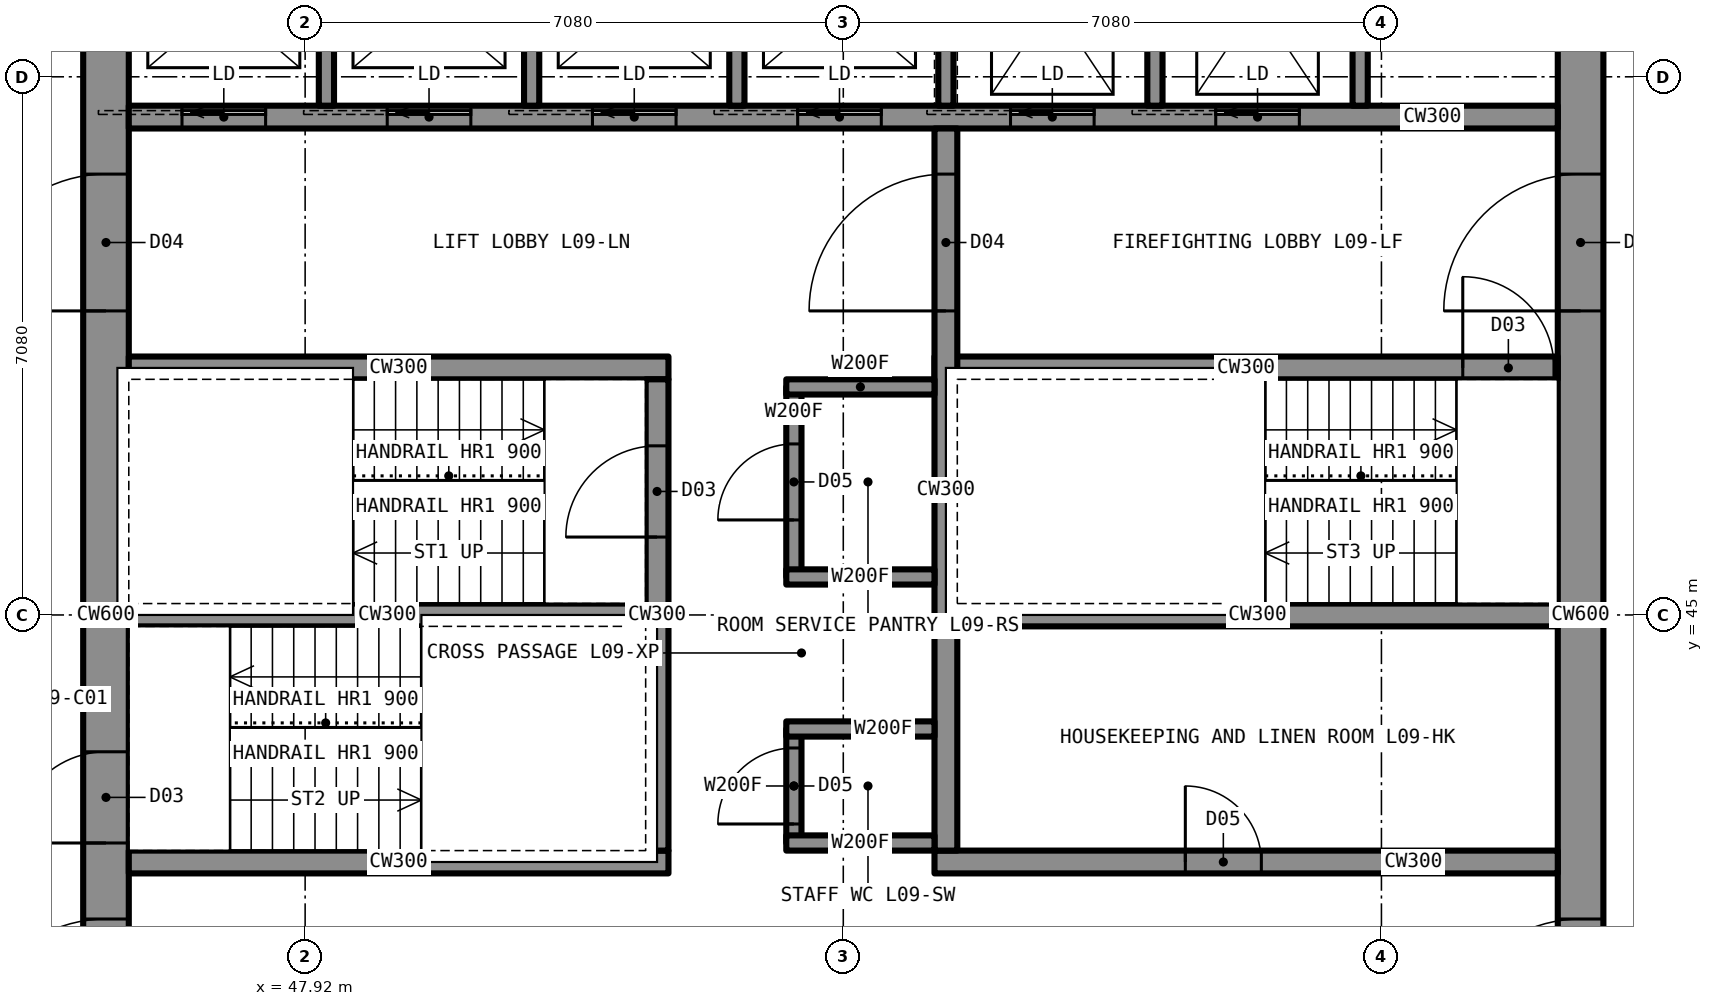
"""IFC4 building model, lengths in metres.
Left out: names, types, materials, properties, quantities, classifications, styles, units other than length and angle.
Written with IfcOpenShell. Run it as: python <this file> out.ifc"""

import sys

from ifc_helpers import new_model, si_unit, direction, frame, frame_2d, origin, place, context, subcontext, project, spatial, rectangle, extrude, element, fill, save


model = new_model("IFC4")
c1 = context("Model", 3, precision=1e-05, world=origin(), true_north=direction((0.0, 1.0)))
c2 = subcontext(c1, "Body", "Model", "MODEL_VIEW")
j1 = project(units=[si_unit("LENGTHUNIT", "METRE"), si_unit("PLANEANGLEUNIT", "RADIAN")], contexts=[c1])
p1 = place(None, origin())
s1 = spatial("IfcSite", under=j1, at=p1, CompositionType="ELEMENT")
p2 = place(p1, origin())
s2 = spatial("IfcBuilding", under=s1, at=p2, CompositionType="ELEMENT")
p3 = place(p2, frame((0.0, 0.0, 39.0)))
s3 = spatial("IfcBuildingStorey", under=s2, at=p3, CompositionType="ELEMENT", Elevation=39.0)
p4 = place(p3, frame((64.7, 35.6, 0.0), z_axis=(0.0, 0.0, 1.0), x_axis=(0.0, 1.0, 0.0)))
e1 = element("IfcWall", 1, at=p4, inside=s3, PredefinedType="SHEAR", context=c2, shape_type="SweptSolid", body=[
    extrude(rectangle(XDim=18.8, YDim=0.6, at=frame_2d((9.4, 0.0))), origin(), (0.0, 0.0, 1.0), 3.5),
])
p5 = place(p4, frame((13.4, 0.0, 0.0)))
e2 = element("IfcOpeningElement", 2, at=p5, cuts=e1, PredefinedType="OPENING", context=c2, shape_type="SweptSolid", body=[
    extrude(rectangle(XDim=1.8, YDim=2.2, at=frame_2d((0.9, 1.1))), frame((0.0, 0.31, 0.0), z_axis=(0.0, -1.0, 0.0), x_axis=(1.0, 0.0, 0.0)), (0.0, 0.0, 1.0), 0.62),
])
p6 = place(p4, frame((3.6, 0.0, 0.0)))
e3 = element("IfcOpeningElement", 3, at=p6, cuts=e1, PredefinedType="OPENING", context=c2, shape_type="SweptSolid", body=[
    extrude(rectangle(XDim=1.8, YDim=2.2, at=frame_2d((0.9, 1.1))), frame((0.0, 0.31, 0.0), z_axis=(0.0, -1.0, 0.0), x_axis=(1.0, 0.0, 0.0)), (0.0, 0.0, 1.0), 0.62),
])
p7 = place(p3, frame((45.3, 35.6, 0.0), z_axis=(0.0, 0.0, 1.0), x_axis=(0.0, 1.0, 0.0)))
e4 = element("IfcWall", 4, at=p7, inside=s3, PredefinedType="SHEAR", context=c2, shape_type="SweptSolid", body=[
    extrude(rectangle(XDim=18.8, YDim=0.6, at=frame_2d((9.4, 0.0))), origin(), (0.0, 0.0, 1.0), 3.5),
])
p8 = place(p7, frame((13.4, 0.0, 0.0)))
e5 = element("IfcOpeningElement", 5, at=p8, cuts=e4, PredefinedType="OPENING", context=c2, shape_type="SweptSolid", body=[
    extrude(rectangle(XDim=1.8, YDim=2.2, at=frame_2d((0.9, 1.1))), frame((0.0, 0.31, 0.0), z_axis=(0.0, -1.0, 0.0), x_axis=(1.0, 0.0, 0.0)), (0.0, 0.0, 1.0), 0.62),
])
p9 = place(p7, frame((3.6, 0.0, 0.0)))
e6 = element("IfcOpeningElement", 6, at=p9, cuts=e4, PredefinedType="OPENING", context=c2, shape_type="SweptSolid", body=[
    extrude(rectangle(XDim=1.8, YDim=2.2, at=frame_2d((0.9, 1.1))), frame((0.0, 0.31, 0.0), z_axis=(0.0, -1.0, 0.0), x_axis=(1.0, 0.0, 0.0)), (0.0, 0.0, 1.0), 0.62),
])
p10 = place(p7, frame((6.4, 0.0, 0.0)))
e7 = element("IfcOpeningElement", 7, at=p10, cuts=e4, PredefinedType="OPENING", context=c2, shape_type="SweptSolid", body=[
    extrude(rectangle(XDim=1.2, YDim=2.2, at=frame_2d((0.6, 1.1))), frame((0.0, 0.31, 0.0), z_axis=(0.0, -1.0, 0.0), x_axis=(1.0, 0.0, 0.0)), (0.0, 0.0, 1.0), 0.62),
])
p11 = place(p3, frame((45.6, 51.55, 0.0), z_axis=(0.0, 0.0, 1.0), x_axis=(1.0, 0.0, 0.0)))
e8 = element("IfcWall", 8, at=p11, inside=s3, PredefinedType="SHEAR", context=c2, shape_type="SweptSolid", body=[
    extrude(rectangle(XDim=18.8, YDim=0.3, at=frame_2d((9.4, 0.0))), origin(), (0.0, 0.0, 1.0), 3.5),
])
p12 = place(p11, frame((0.7, 0.0, 0.0)))
e9 = element("IfcOpeningElement", 9, at=p12, cuts=e8, PredefinedType="OPENING", context=c2, shape_type="SweptSolid", body=[
    extrude(rectangle(XDim=1.1, YDim=2.2, at=frame_2d((0.55, 1.1))), frame((0.0, 0.16, 0.0), z_axis=(0.0, -1.0, 0.0), x_axis=(1.0, 0.0, 0.0)), (0.0, 0.0, 1.0), 0.32),
])
p13 = place(p11, frame((3.4, 0.0, 0.0)))
e10 = element("IfcOpeningElement", 10, at=p13, cuts=e8, PredefinedType="OPENING", context=c2, shape_type="SweptSolid", body=[
    extrude(rectangle(XDim=1.1, YDim=2.2, at=frame_2d((0.55, 1.1))), frame((0.0, 0.16, 0.0), z_axis=(0.0, -1.0, 0.0), x_axis=(1.0, 0.0, 0.0)), (0.0, 0.0, 1.0), 0.32),
])
p14 = place(p11, frame((6.1, 0.0, 0.0)))
e11 = element("IfcOpeningElement", 11, at=p14, cuts=e8, PredefinedType="OPENING", context=c2, shape_type="SweptSolid", body=[
    extrude(rectangle(XDim=1.1, YDim=2.2, at=frame_2d((0.55, 1.1))), frame((0.0, 0.16, 0.0), z_axis=(0.0, -1.0, 0.0), x_axis=(1.0, 0.0, 0.0)), (0.0, 0.0, 1.0), 0.32),
])
p15 = place(p11, frame((8.8, 0.0, 0.0)))
e12 = element("IfcOpeningElement", 12, at=p15, cuts=e8, PredefinedType="OPENING", context=c2, shape_type="SweptSolid", body=[
    extrude(rectangle(XDim=1.1, YDim=2.2, at=frame_2d((0.55, 1.1))), frame((0.0, 0.16, 0.0), z_axis=(0.0, -1.0, 0.0), x_axis=(1.0, 0.0, 0.0)), (0.0, 0.0, 1.0), 0.32),
])
p16 = place(p11, frame((11.6, 0.0, 0.0)))
e13 = element("IfcOpeningElement", 13, at=p16, cuts=e8, PredefinedType="OPENING", context=c2, shape_type="SweptSolid", body=[
    extrude(rectangle(XDim=1.1, YDim=2.2, at=frame_2d((0.55, 1.1))), frame((0.0, 0.16, 0.0), z_axis=(0.0, -1.0, 0.0), x_axis=(1.0, 0.0, 0.0)), (0.0, 0.0, 1.0), 0.32),
])
p17 = place(p11, frame((14.3, 0.0, 0.0)))
e14 = element("IfcOpeningElement", 14, at=p17, cuts=e8, PredefinedType="OPENING", context=c2, shape_type="SweptSolid", body=[
    extrude(rectangle(XDim=1.1, YDim=2.2, at=frame_2d((0.55, 1.1))), frame((0.0, 0.16, 0.0), z_axis=(0.0, -1.0, 0.0), x_axis=(1.0, 0.0, 0.0)), (0.0, 0.0, 1.0), 0.32),
])
p18 = place(p3, frame((45.6, 48.25, 0.0), z_axis=(0.0, 0.0, 1.0), x_axis=(1.0, 0.0, 0.0)))
e15 = element("IfcWall", 15, at=p18, inside=s3, PredefinedType="SHEAR", context=c2, shape_type="SweptSolid", body=[
    extrude(rectangle(XDim=7.1, YDim=0.3, at=frame_2d((3.55, 0.0))), origin(), (0.0, 0.0, 1.0), 3.5),
])
p19 = place(p3, frame((56.2, 48.25, 0.0), z_axis=(0.0, 0.0, 1.0), x_axis=(1.0, 0.0, 0.0)))
e16 = element("IfcWall", 16, at=p19, inside=s3, PredefinedType="SHEAR", context=c2, shape_type="SweptSolid", body=[
    extrude(rectangle(XDim=8.2, YDim=0.3, at=frame_2d((4.1, 0.0))), origin(), (0.0, 0.0, 1.0), 3.5),
])
p20 = place(p19, frame((6.95, 0.0, 0.0)))
e17 = element("IfcOpeningElement", 17, at=p20, cuts=e16, PredefinedType="OPENING", context=c2, shape_type="SweptSolid", body=[
    extrude(rectangle(XDim=1.2, YDim=2.2, at=frame_2d((0.6, 1.1))), frame((0.0, 0.16, 0.0), z_axis=(0.0, -1.0, 0.0), x_axis=(1.0, 0.0, 0.0)), (0.0, 0.0, 1.0), 0.32),
])
p21 = place(p3, frame((45.6, 41.75, 0.0), z_axis=(0.0, 0.0, 1.0), x_axis=(1.0, 0.0, 0.0)))
e18 = element("IfcWall", 18, at=p21, inside=s3, PredefinedType="SHEAR", context=c2, shape_type="SweptSolid", body=[
    extrude(rectangle(XDim=7.1, YDim=0.3, at=frame_2d((3.55, 0.0))), origin(), (0.0, 0.0, 1.0), 3.5),
])
p22 = place(p3, frame((56.2, 41.75, 0.0), z_axis=(0.0, 0.0, 1.0), x_axis=(1.0, 0.0, 0.0)))
e19 = element("IfcWall", 19, at=p22, inside=s3, PredefinedType="SHEAR", context=c2, shape_type="SweptSolid", body=[
    extrude(rectangle(XDim=8.2, YDim=0.3, at=frame_2d((4.1, 0.0))), origin(), (0.0, 0.0, 1.0), 3.5),
])
p23 = place(p22, frame((3.3, 0.0, 0.0)))
e20 = element("IfcOpeningElement", 20, at=p23, cuts=e19, PredefinedType="OPENING", context=c2, shape_type="SweptSolid", body=[
    extrude(rectangle(XDim=1.0, YDim=2.1, at=frame_2d((0.5, 1.05))), frame((0.0, 0.16, 0.0), z_axis=(0.0, -1.0, 0.0), x_axis=(1.0, 0.0, 0.0)), (0.0, 0.0, 1.0), 0.32),
])
p24 = place(p3, frame((52.55, 41.9, 0.0), z_axis=(0.0, 0.0, 1.0), x_axis=(0.0, 1.0, 0.0)))
e21 = element("IfcWall", 21, at=p24, inside=s3, PredefinedType="SHEAR", context=c2, shape_type="SweptSolid", body=[
    extrude(rectangle(XDim=6.2, YDim=0.3, at=frame_2d((3.1, 0.0))), origin(), (0.0, 0.0, 1.0), 3.5),
])
p25 = place(p24, frame((4.125, 0.0, 0.0)))
e22 = element("IfcOpeningElement", 22, at=p25, cuts=e21, PredefinedType="OPENING", context=c2, shape_type="SweptSolid", body=[
    extrude(rectangle(XDim=1.2, YDim=2.2, at=frame_2d((0.6, 1.1))), frame((0.0, 0.16, 0.0), z_axis=(0.0, -1.0, 0.0), x_axis=(1.0, 0.0, 0.0)), (0.0, 0.0, 1.0), 0.32),
])
p26 = place(p3, frame((56.35, 41.9, 0.0), z_axis=(0.0, 0.0, 1.0), x_axis=(0.0, 1.0, 0.0)))
e23 = element("IfcWall", 23, at=p26, inside=s3, PredefinedType="SHEAR", context=c2, shape_type="SweptSolid", body=[
    extrude(rectangle(XDim=9.5, YDim=0.3, at=frame_2d((4.75, 0.0))), origin(), (0.0, 0.0, 1.0), 3.5),
])
p27 = place(p26, frame((7.1, 0.0, 0.0)))
e24 = element("IfcOpeningElement", 24, at=p27, cuts=e23, PredefinedType="OPENING", context=c2, shape_type="SweptSolid", body=[
    extrude(rectangle(XDim=1.8, YDim=2.2, at=frame_2d((0.9, 1.1))), frame((0.0, 0.16, 0.0), z_axis=(0.0, -1.0, 0.0), x_axis=(1.0, 0.0, 0.0)), (0.0, 0.0, 1.0), 0.32),
])
p28 = place(p3, frame((45.6, 45.0, 0.0), z_axis=(0.0, 0.0, 1.0), x_axis=(1.0, 0.0, 0.0)))
e25 = element("IfcWall", 25, at=p28, inside=s3, PredefinedType="SHEAR", context=c2, shape_type="SweptSolid", body=[
    extrude(rectangle(XDim=6.8, YDim=0.3, at=frame_2d((3.4, 0.0))), origin(), (0.0, 0.0, 1.0), 3.5),
])
p29 = place(p3, frame((56.5, 45.0, 0.0), z_axis=(0.0, 0.0, 1.0), x_axis=(1.0, 0.0, 0.0)))
e26 = element("IfcWall", 26, at=p29, inside=s3, PredefinedType="SHEAR", context=c2, shape_type="SweptSolid", body=[
    extrude(rectangle(XDim=7.9, YDim=0.3, at=frame_2d((3.95, 0.0))), origin(), (0.0, 0.0, 1.0), 3.5),
])
p30 = place(p3, frame((54.35, 42.0, 0.0), z_axis=(0.0, 0.0, 1.0), x_axis=(0.0, 1.0, 0.0)))
e27 = element("IfcWall", 27, at=p30, inside=s3, PredefinedType="PARTITIONING", context=c2, shape_type="SweptSolid", body=[
    extrude(rectangle(XDim=1.5, YDim=0.2, at=frame_2d((0.75, 0.0))), origin(), (0.0, 0.0, 1.0), 3.33),
])
p31 = place(p30, frame((0.25, 0.0, 0.0)))
e28 = element("IfcOpeningElement", 28, at=p31, cuts=e27, PredefinedType="OPENING", context=c2, shape_type="SweptSolid", body=[
    extrude(rectangle(XDim=1.0, YDim=2.1, at=frame_2d((0.5, 1.05))), frame((0.0, 0.11, 0.0), z_axis=(0.0, -1.0, 0.0), x_axis=(1.0, 0.0, 0.0)), (0.0, 0.0, 1.0), 0.22),
])
for number, where, z_axis, x_axis in (
    (29, (54.25, 42.0, 0.0), (0.0, 0.0, 1.0), (1.0, 0.0, 0.0)),
    (30, (54.25, 43.5, 0.0), (0.0, 0.0, 1.0), (1.0, 0.0, 0.0)),
):
    element("IfcWall", number, at=place(p3, frame(where, z_axis=z_axis, x_axis=x_axis)), inside=s3, PredefinedType="PARTITIONING", context=c2, shape_type="SweptSolid", body=[
        extrude(rectangle(XDim=1.95, YDim=0.2, at=frame_2d((0.975, 0.0))), origin(), (0.0, 0.0, 1.0), 3.33),
    ])
p32 = place(p3, frame((54.35, 45.5, 0.0), z_axis=(0.0, 0.0, 1.0), x_axis=(0.0, 1.0, 0.0)))
e31 = element("IfcWall", 31, at=p32, inside=s3, PredefinedType="PARTITIONING", context=c2, shape_type="SweptSolid", body=[
    extrude(rectangle(XDim=2.5, YDim=0.2, at=frame_2d((1.25, 0.0))), origin(), (0.0, 0.0, 1.0), 3.33),
])
p33 = place(p32, frame((0.75, 0.0, 0.0)))
e32 = element("IfcOpeningElement", 32, at=p33, cuts=e31, PredefinedType="OPENING", context=c2, shape_type="SweptSolid", body=[
    extrude(rectangle(XDim=1.0, YDim=2.1, at=frame_2d((0.5, 1.05))), frame((0.0, 0.11, 0.0), z_axis=(0.0, -1.0, 0.0), x_axis=(1.0, 0.0, 0.0)), (0.0, 0.0, 1.0), 0.22),
])
for number, where, z_axis, x_axis in (
    (33, (54.25, 45.5, 0.0), (0.0, 0.0, 1.0), (1.0, 0.0, 0.0)),
    (34, (54.25, 48.0, 0.0), (0.0, 0.0, 1.0), (1.0, 0.0, 0.0)),
):
    element("IfcWall", number, at=place(p3, frame(where, z_axis=z_axis, x_axis=x_axis)), inside=s3, PredefinedType="PARTITIONING", context=c2, shape_type="SweptSolid", body=[
        extrude(rectangle(XDim=1.95, YDim=0.2, at=frame_2d((0.975, 0.0))), origin(), (0.0, 0.0, 1.0), 3.33),
    ])
for number, where, z_axis, x_axis in (
    (35, (48.2, 51.7, 0.0), (0.0, 0.0, 1.0), (0.0, 1.0, 0.0)),
    (36, (50.9, 51.7, 0.0), (0.0, 0.0, 1.0), (0.0, 1.0, 0.0)),
    (37, (53.6, 51.7, 0.0), (0.0, 0.0, 1.0), (0.0, 1.0, 0.0)),
    (38, (59.1, 51.7, 0.0), (0.0, 0.0, 1.0), (0.0, 1.0, 0.0)),
    (39, (61.8, 51.7, 0.0), (0.0, 0.0, 1.0), (0.0, 1.0, 0.0)),
    (40, (56.35, 51.7, 0.0), (0.0, 0.0, 1.0), (0.0, 1.0, 0.0)),
):
    element("IfcWall", number, at=place(p3, frame(where, z_axis=z_axis, x_axis=x_axis)), inside=s3, PredefinedType="PARTITIONING", context=c2, shape_type="SweptSolid", body=[
        extrude(rectangle(XDim=2.7, YDim=0.2, at=frame_2d((1.35, 0.0))), origin(), (0.0, 0.0, 1.0), 3.33),
    ])
p34 = place(p31, origin())
e41 = element("IfcDoor", 41, at=p34, inside=s3, OperationType="SINGLE_SWING_LEFT", PredefinedType="DOOR", context=c2, shape_type="SweptSolid", body=[
    extrude(rectangle(XDim=1.0, YDim=2.1, at=frame_2d((0.5, 1.05))), frame((0.0, 0.025, 0.0), z_axis=(0.0, -1.0, 0.0), x_axis=(1.0, 0.0, 0.0)), (0.0, 0.0, 1.0), 0.05),
])
fill(e28, e41)
p35 = place(p33, origin())
e42 = element("IfcDoor", 42, at=p35, inside=s3, OperationType="SINGLE_SWING_LEFT", PredefinedType="DOOR", context=c2, shape_type="SweptSolid", body=[
    extrude(rectangle(XDim=1.0, YDim=2.1, at=frame_2d((0.5, 1.05))), frame((0.0, 0.025, 0.0), z_axis=(0.0, -1.0, 0.0), x_axis=(1.0, 0.0, 0.0)), (0.0, 0.0, 1.0), 0.05),
])
fill(e32, e42)
p36 = place(p8, origin())
e43 = element("IfcDoor", 43, at=p36, inside=s3, OperationType="DOUBLE_DOOR_SINGLE_SWING", PredefinedType="DOOR", context=c2, shape_type="SweptSolid", body=[
    extrude(rectangle(XDim=1.8, YDim=2.2, at=frame_2d((0.9, 1.1))), frame((0.0, 0.025, 0.0), z_axis=(0.0, -1.0, 0.0), x_axis=(1.0, 0.0, 0.0)), (0.0, 0.0, 1.0), 0.05),
])
fill(e5, e43)
p37 = place(p9, origin())
e44 = element("IfcDoor", 44, at=p37, inside=s3, OperationType="DOUBLE_DOOR_SINGLE_SWING", PredefinedType="DOOR", context=c2, shape_type="SweptSolid", body=[
    extrude(rectangle(XDim=1.8, YDim=2.2, at=frame_2d((0.9, 1.1))), frame((0.0, 0.025, 0.0), z_axis=(0.0, -1.0, 0.0), x_axis=(1.0, 0.0, 0.0)), (0.0, 0.0, 1.0), 0.05),
])
fill(e6, e44)
p38 = place(p5, origin())
e45 = element("IfcDoor", 45, at=p38, inside=s3, OperationType="DOUBLE_DOOR_SINGLE_SWING", PredefinedType="DOOR", context=c2, shape_type="SweptSolid", body=[
    extrude(rectangle(XDim=1.8, YDim=2.2, at=frame_2d((0.9, 1.1))), frame((0.0, 0.025, 0.0), z_axis=(0.0, -1.0, 0.0), x_axis=(1.0, 0.0, 0.0)), (0.0, 0.0, 1.0), 0.05),
])
fill(e2, e45)
p39 = place(p6, origin())
e46 = element("IfcDoor", 46, at=p39, inside=s3, OperationType="DOUBLE_DOOR_SINGLE_SWING", PredefinedType="DOOR", context=c2, shape_type="SweptSolid", body=[
    extrude(rectangle(XDim=1.8, YDim=2.2, at=frame_2d((0.9, 1.1))), frame((0.0, 0.025, 0.0), z_axis=(0.0, -1.0, 0.0), x_axis=(1.0, 0.0, 0.0)), (0.0, 0.0, 1.0), 0.05),
])
fill(e3, e46)
p40 = place(p27, origin())
e47 = element("IfcDoor", 47, at=p40, inside=s3, OperationType="DOUBLE_DOOR_SINGLE_SWING", PredefinedType="DOOR", context=c2, shape_type="SweptSolid", body=[
    extrude(rectangle(XDim=1.8, YDim=2.2, at=frame_2d((0.9, 1.1))), frame((0.0, 0.025, 0.0), z_axis=(0.0, -1.0, 0.0), x_axis=(1.0, 0.0, 0.0)), (0.0, 0.0, 1.0), 0.05),
])
fill(e24, e47)
p41 = place(p25, origin())
e48 = element("IfcDoor", 48, at=p41, inside=s3, OperationType="SINGLE_SWING_LEFT", PredefinedType="DOOR", context=c2, shape_type="SweptSolid", body=[
    extrude(rectangle(XDim=1.2, YDim=2.2, at=frame_2d((0.6, 1.1))), frame((0.0, 0.025, 0.0), z_axis=(0.0, -1.0, 0.0), x_axis=(1.0, 0.0, 0.0)), (0.0, 0.0, 1.0), 0.05),
])
fill(e22, e48)
p42 = place(p10, origin())
e49 = element("IfcDoor", 49, at=p42, inside=s3, OperationType="SINGLE_SWING_LEFT", PredefinedType="DOOR", context=c2, shape_type="SweptSolid", body=[
    extrude(rectangle(XDim=1.2, YDim=2.2, at=frame_2d((0.6, 1.1))), frame((0.0, 0.025, 0.0), z_axis=(0.0, -1.0, 0.0), x_axis=(1.0, 0.0, 0.0)), (0.0, 0.0, 1.0), 0.05),
])
fill(e7, e49)
p43 = place(p20, origin())
e50 = element("IfcDoor", 50, at=p43, inside=s3, OperationType="SINGLE_SWING_LEFT", PredefinedType="DOOR", context=c2, shape_type="SweptSolid", body=[
    extrude(rectangle(XDim=1.2, YDim=2.2, at=frame_2d((0.6, 1.1))), frame((0.0, 0.025, 0.0), z_axis=(0.0, -1.0, 0.0), x_axis=(1.0, 0.0, 0.0)), (0.0, 0.0, 1.0), 0.05),
])
fill(e17, e50)
p44 = place(p23, origin())
e51 = element("IfcDoor", 51, at=p44, inside=s3, OperationType="SINGLE_SWING_LEFT", PredefinedType="DOOR", context=c2, shape_type="SweptSolid", body=[
    extrude(rectangle(XDim=1.0, YDim=2.1, at=frame_2d((0.5, 1.05))), frame((0.0, 0.025, 0.0), z_axis=(0.0, -1.0, 0.0), x_axis=(1.0, 0.0, 0.0)), (0.0, 0.0, 1.0), 0.05),
])
fill(e20, e51)
p45 = place(p12, origin())
e52 = element("IfcDoor", 52, at=p45, inside=s3, OperationType="SLIDING_TO_LEFT", PredefinedType="DOOR", context=c2, shape_type="SweptSolid", body=[
    extrude(rectangle(XDim=1.1, YDim=2.2, at=frame_2d((0.55, 1.1))), frame((0.0, 0.025, 0.0), z_axis=(0.0, -1.0, 0.0), x_axis=(1.0, 0.0, 0.0)), (0.0, 0.0, 1.0), 0.05),
])
fill(e9, e52)
p46 = place(p13, origin())
e53 = element("IfcDoor", 53, at=p46, inside=s3, OperationType="SLIDING_TO_LEFT", PredefinedType="DOOR", context=c2, shape_type="SweptSolid", body=[
    extrude(rectangle(XDim=1.1, YDim=2.2, at=frame_2d((0.55, 1.1))), frame((0.0, 0.025, 0.0), z_axis=(0.0, -1.0, 0.0), x_axis=(1.0, 0.0, 0.0)), (0.0, 0.0, 1.0), 0.05),
])
fill(e10, e53)
p47 = place(p14, origin())
e54 = element("IfcDoor", 54, at=p47, inside=s3, OperationType="SLIDING_TO_LEFT", PredefinedType="DOOR", context=c2, shape_type="SweptSolid", body=[
    extrude(rectangle(XDim=1.1, YDim=2.2, at=frame_2d((0.55, 1.1))), frame((0.0, 0.025, 0.0), z_axis=(0.0, -1.0, 0.0), x_axis=(1.0, 0.0, 0.0)), (0.0, 0.0, 1.0), 0.05),
])
fill(e11, e54)
p48 = place(p15, origin())
e55 = element("IfcDoor", 55, at=p48, inside=s3, OperationType="SLIDING_TO_LEFT", PredefinedType="DOOR", context=c2, shape_type="SweptSolid", body=[
    extrude(rectangle(XDim=1.1, YDim=2.2, at=frame_2d((0.55, 1.1))), frame((0.0, 0.025, 0.0), z_axis=(0.0, -1.0, 0.0), x_axis=(1.0, 0.0, 0.0)), (0.0, 0.0, 1.0), 0.05),
])
fill(e12, e55)
p49 = place(p16, origin())
e56 = element("IfcDoor", 56, at=p49, inside=s3, OperationType="SLIDING_TO_LEFT", PredefinedType="DOOR", context=c2, shape_type="SweptSolid", body=[
    extrude(rectangle(XDim=1.1, YDim=2.2, at=frame_2d((0.55, 1.1))), frame((0.0, 0.025, 0.0), z_axis=(0.0, -1.0, 0.0), x_axis=(1.0, 0.0, 0.0)), (0.0, 0.0, 1.0), 0.05),
])
fill(e13, e56)
p50 = place(p17, origin())
e57 = element("IfcDoor", 57, at=p50, inside=s3, OperationType="SLIDING_TO_LEFT", PredefinedType="DOOR", context=c2, shape_type="SweptSolid", body=[
    extrude(rectangle(XDim=1.1, YDim=2.2, at=frame_2d((0.55, 1.1))), frame((0.0, 0.025, 0.0), z_axis=(0.0, -1.0, 0.0), x_axis=(1.0, 0.0, 0.0)), (0.0, 0.0, 1.0), 0.05),
])
fill(e14, e57)
save(model, sys.argv[1])
